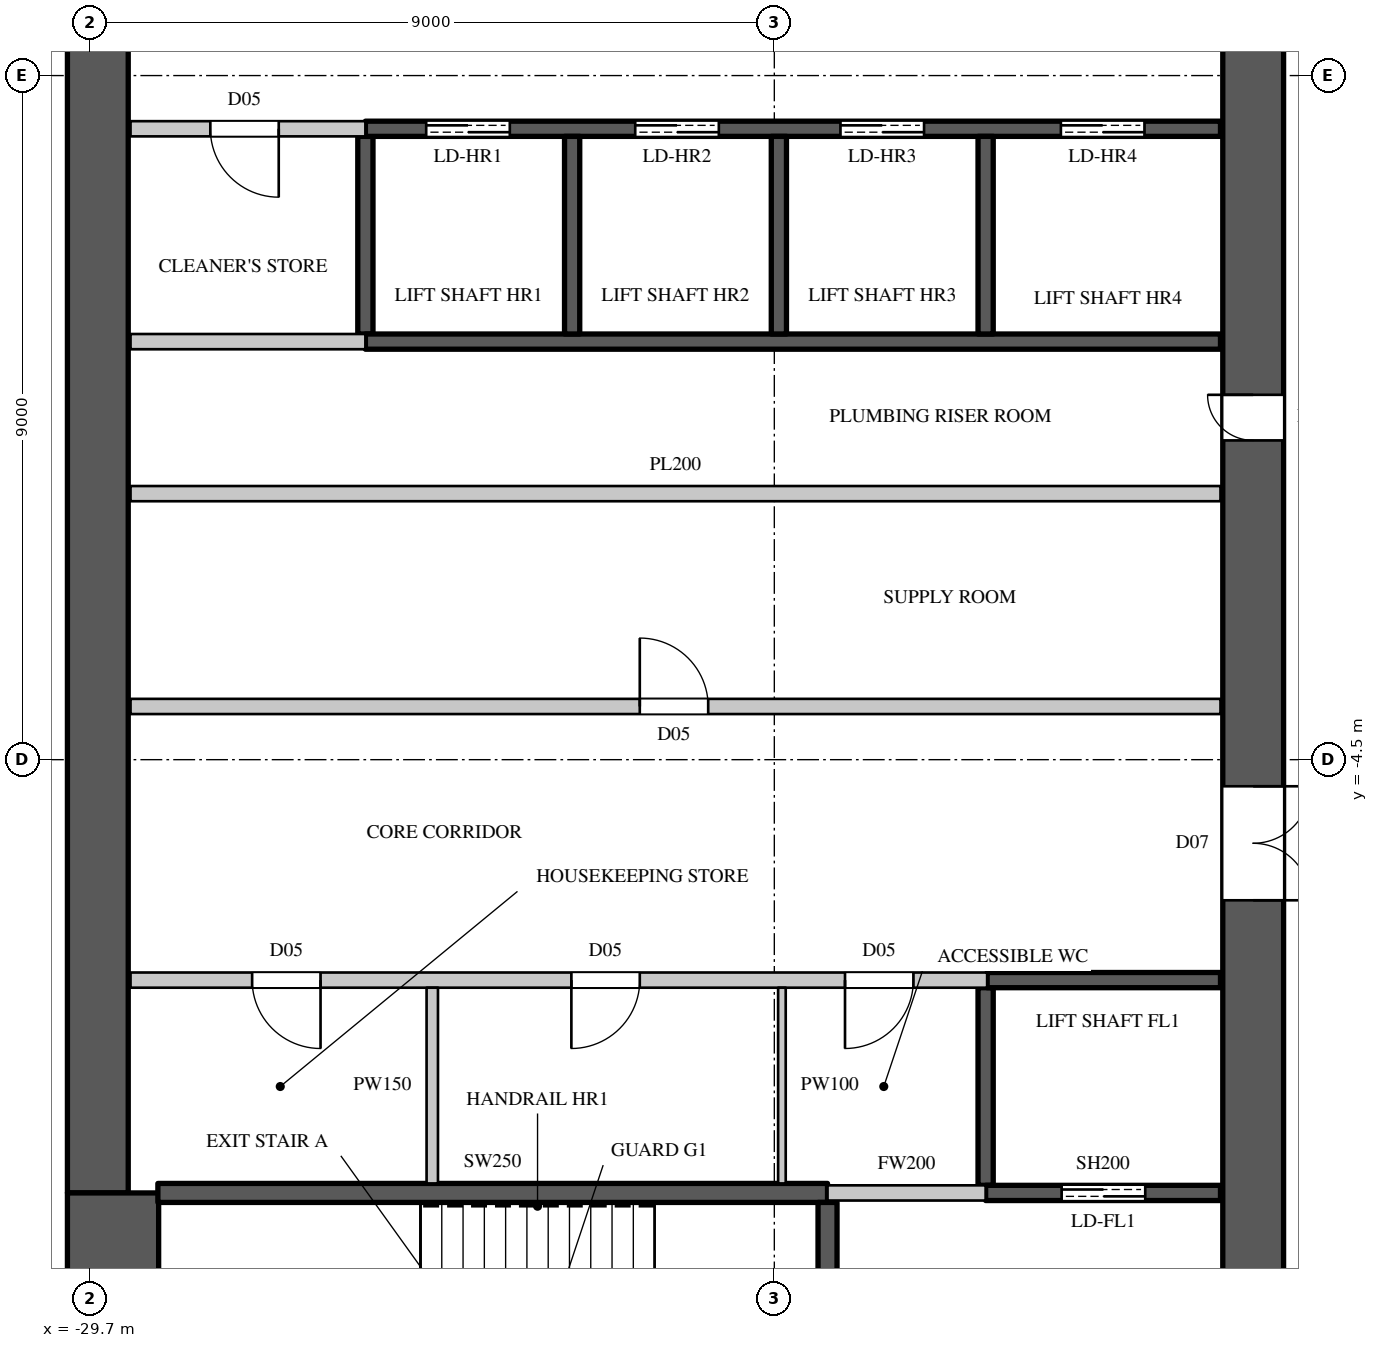
"""IFC4 building model, lengths in metres.
Left out: names, types, materials, properties, quantities, classifications, styles, units other than length and angle.
Written with IfcOpenShell. Run it as: python <this file> out.ifc"""

import sys

from ifc_helpers import new_model, si_unit, direction, frame, frame_2d, origin, place, context, subcontext, project, spatial, rectangle, extrude, element, fill, save


model = new_model("IFC4")
c1 = context("Model", 3, precision=1e-05, world=origin(), true_north=direction((0.0, 1.0)))
c2 = subcontext(c1, "Body", "Model", "MODEL_VIEW")
j1 = project(units=[si_unit("LENGTHUNIT", "METRE"), si_unit("PLANEANGLEUNIT", "RADIAN")], contexts=[c1])
p1 = place(None, origin())
s1 = spatial("IfcSite", under=j1, at=p1, CompositionType="ELEMENT")
p2 = place(p1, origin())
s2 = spatial("IfcBuilding", under=s1, at=p2, CompositionType="ELEMENT")
p3 = place(p2, frame((0.0, 0.0, 226.1)))
s3 = spatial("IfcBuildingStorey", under=s2, at=p3, CompositionType="ELEMENT", Elevation=226.1)
p4 = place(p3, frame((-14.4, -14.8, 0.0), z_axis=(0.0, 0.0, 1.0), x_axis=(0.0, 1.0, 0.0)))
e1 = element("IfcWall", 1, at=p4, inside=s3, PredefinedType="SHEAR", context=c2, shape_type="SweptSolid", body=[
    extrude(rectangle(XDim=29.6, YDim=0.8, at=frame_2d((14.8, 0.0))), origin(), (0.0, 0.0, 1.0), 4.1),
])
p5 = place(p4, frame((1.55, 0.0, 0.0)))
e2 = element("IfcOpeningElement", 2, at=p5, cuts=e1, PredefinedType="OPENING", context=c2, shape_type="SweptSolid", body=[
    extrude(rectangle(XDim=1.5, YDim=2.4, at=frame_2d((0.75, 1.2))), frame((0.0, 0.41, 0.0), z_axis=(0.0, -1.0, 0.0), x_axis=(1.0, 0.0, 0.0)), (0.0, 0.0, 1.0), 0.82),
])
p6 = place(p4, frame((26.55, 0.0, 0.0)))
e3 = element("IfcOpeningElement", 3, at=p6, cuts=e1, PredefinedType="OPENING", context=c2, shape_type="SweptSolid", body=[
    extrude(rectangle(XDim=1.5, YDim=2.4, at=frame_2d((0.75, 1.2))), frame((0.0, 0.41, 0.0), z_axis=(0.0, -1.0, 0.0), x_axis=(1.0, 0.0, 0.0)), (0.0, 0.0, 1.0), 0.82),
])
p7 = place(p4, frame((8.45, 0.0, 0.0)))
e4 = element("IfcOpeningElement", 4, at=p7, cuts=e1, PredefinedType="OPENING", context=c2, shape_type="SweptSolid", body=[
    extrude(rectangle(XDim=1.5, YDim=2.4, at=frame_2d((0.75, 1.2))), frame((0.0, 0.41, 0.0), z_axis=(0.0, -1.0, 0.0), x_axis=(1.0, 0.0, 0.0)), (0.0, 0.0, 1.0), 0.82),
])
p8 = place(p4, frame((19.65, 0.0, 0.0)))
e5 = element("IfcOpeningElement", 5, at=p8, cuts=e1, PredefinedType="OPENING", context=c2, shape_type="SweptSolid", body=[
    extrude(rectangle(XDim=1.5, YDim=2.4, at=frame_2d((0.75, 1.2))), frame((0.0, 0.41, 0.0), z_axis=(0.0, -1.0, 0.0), x_axis=(1.0, 0.0, 0.0)), (0.0, 0.0, 1.0), 0.82),
])
p9 = place(p4, frame((14.5, 0.0, 0.0)))
e6 = element("IfcOpeningElement", 6, at=p9, cuts=e1, PredefinedType="OPENING", context=c2, shape_type="SweptSolid", body=[
    extrude(rectangle(XDim=0.6, YDim=2.0, at=frame_2d((0.3, 1.0))), frame((0.0, 0.41, 0.0), z_axis=(0.0, -1.0, 0.0), x_axis=(1.0, 0.0, 0.0)), (0.0, 0.0, 1.0), 0.82),
])
p10 = place(p3, frame((-29.6, -10.2, 0.0), z_axis=(0.0, 0.0, 1.0), x_axis=(0.0, 1.0, 0.0)))
e7 = element("IfcWall", 7, at=p10, inside=s3, PredefinedType="SHEAR", context=c2, shape_type="SweptSolid", body=[
    extrude(rectangle(XDim=20.4, YDim=0.8, at=frame_2d((10.2, 0.0))), origin(), (0.0, 0.0, 1.0), 4.1),
])
p11 = place(p3, frame((-29.4, -14.8, 0.0), z_axis=(0.0, 0.0, 1.0), x_axis=(0.0, 1.0, 0.0)))
e8 = element("IfcWall", 8, at=p11, inside=s3, PredefinedType="SHEAR", context=c2, shape_type="SweptSolid", body=[
    extrude(rectangle(XDim=4.6, YDim=1.2, at=frame_2d((2.3, 0.0))), origin(), (0.0, 0.0, 1.0), 4.1),
])
p12 = place(p3, frame((-29.17, -7.4, 0.0), z_axis=(0.0, 0.0, 1.0), x_axis=(1.0, 0.0, 0.0)))
e9 = element("IfcWall", 9, at=p12, inside=s3, PredefinedType="PARTITIONING", context=c2, shape_type="SweptSolid", body=[
    extrude(rectangle(XDim=11.27, YDim=0.2, at=frame_2d((5.635, 0.0))), origin(), (0.0, 0.0, 1.0), 3.8),
])
p13 = place(p12, frame((1.6, 0.0, 0.0)))
e10 = element("IfcOpeningElement", 10, at=p13, cuts=e9, PredefinedType="OPENING", context=c2, shape_type="SweptSolid", body=[
    extrude(rectangle(XDim=0.9, YDim=2.2, at=frame_2d((0.45, 1.1))), frame((0.0, 0.11, 0.0), z_axis=(0.0, -1.0, 0.0), x_axis=(1.0, 0.0, 0.0)), (0.0, 0.0, 1.0), 0.22),
])
p14 = place(p12, frame((5.8, 0.0, 0.0)))
e11 = element("IfcOpeningElement", 11, at=p14, cuts=e9, PredefinedType="OPENING", context=c2, shape_type="SweptSolid", body=[
    extrude(rectangle(XDim=0.9, YDim=2.2, at=frame_2d((0.45, 1.1))), frame((0.0, 0.11, 0.0), z_axis=(0.0, -1.0, 0.0), x_axis=(1.0, 0.0, 0.0)), (0.0, 0.0, 1.0), 0.22),
])
p15 = place(p12, frame((9.4, 0.0, 0.0)))
e12 = element("IfcOpeningElement", 12, at=p15, cuts=e9, PredefinedType="OPENING", context=c2, shape_type="SweptSolid", body=[
    extrude(rectangle(XDim=0.9, YDim=2.2, at=frame_2d((0.45, 1.1))), frame((0.0, 0.11, 0.0), z_axis=(0.0, -1.0, 0.0), x_axis=(1.0, 0.0, 0.0)), (0.0, 0.0, 1.0), 0.22),
])
p16 = place(p3, frame((-29.17, -3.8, 0.0), z_axis=(0.0, 0.0, 1.0), x_axis=(1.0, 0.0, 0.0)))
e13 = element("IfcWall", 13, at=p16, inside=s3, PredefinedType="PARTITIONING", context=c2, shape_type="SweptSolid", body=[
    extrude(rectangle(XDim=14.34, YDim=0.2, at=frame_2d((7.17, 0.0))), origin(), (0.0, 0.0, 1.0), 3.8),
])
p17 = place(p16, frame((6.7, 0.0, 0.0)))
e14 = element("IfcOpeningElement", 14, at=p17, cuts=e13, PredefinedType="OPENING", context=c2, shape_type="SweptSolid", body=[
    extrude(rectangle(XDim=0.9, YDim=2.2, at=frame_2d((0.45, 1.1))), frame((0.0, 0.11, 0.0), z_axis=(0.0, -1.0, 0.0), x_axis=(1.0, 0.0, 0.0)), (0.0, 0.0, 1.0), 0.22),
])
p18 = place(p3, frame((-29.17, 3.8, 0.0), z_axis=(0.0, 0.0, 1.0), x_axis=(1.0, 0.0, 0.0)))
e15 = element("IfcWall", 15, at=p18, inside=s3, PredefinedType="PARTITIONING", context=c2, shape_type="SweptSolid", body=[
    extrude(rectangle(XDim=3.09, YDim=0.2, at=frame_2d((1.545, 0.0))), origin(), (0.0, 0.0, 1.0), 3.8),
])
p19 = place(p18, frame((1.05, 0.0, 0.0)))
e16 = element("IfcOpeningElement", 16, at=p19, cuts=e15, PredefinedType="OPENING", context=c2, shape_type="SweptSolid", body=[
    extrude(rectangle(XDim=0.9, YDim=2.2, at=frame_2d((0.45, 1.1))), frame((0.0, 0.11, 0.0), z_axis=(0.0, -1.0, 0.0), x_axis=(1.0, 0.0, 0.0)), (0.0, 0.0, 1.0), 0.22),
])
p20 = place(p3, frame((-20.0, -10.2, 0.0), z_axis=(0.0, 0.0, 1.0), x_axis=(1.0, 0.0, 0.0)))
e17 = element("IfcWall", 17, at=p20, inside=s3, PredefinedType="PARTITIONING", context=c2, shape_type="SweptSolid", body=[
    extrude(rectangle(XDim=2.08, YDim=0.2, at=frame_2d((1.04, 0.0))), origin(), (0.0, 0.0, 1.0), 3.8),
])
p21 = place(p3, frame((-25.2, -10.075, 0.0), z_axis=(0.0, 0.0, 1.0), x_axis=(0.0, 1.0, 0.0)))
e18 = element("IfcWall", 18, at=p21, inside=s3, PredefinedType="PARTITIONING", context=c2, shape_type="SweptSolid", body=[
    extrude(rectangle(XDim=2.575, YDim=0.15, at=frame_2d((1.288, 0.0))), origin(), (0.0, 0.0, 1.0), 3.8),
])
p22 = place(p3, frame((-29.17, -1.0, 0.0), z_axis=(0.0, 0.0, 1.0), x_axis=(1.0, 0.0, 0.0)))
e19 = element("IfcWall", 19, at=p22, inside=s3, PredefinedType="PARTITIONING", context=c2, shape_type="SweptSolid", body=[
    extrude(rectangle(XDim=14.34, YDim=0.2, at=frame_2d((7.17, 0.0))), origin(), (0.0, 0.0, 1.0), 3.8),
])
p23 = place(p3, frame((-29.17, 1.0, 0.0), z_axis=(0.0, 0.0, 1.0), x_axis=(1.0, 0.0, 0.0)))
e20 = element("IfcWall", 20, at=p23, inside=s3, PredefinedType="PARTITIONING", context=c2, shape_type="SweptSolid", body=[
    extrude(rectangle(XDim=3.09, YDim=0.2, at=frame_2d((1.545, 0.0))), origin(), (0.0, 0.0, 1.0), 3.8),
])
p24 = place(p3, frame((-26.08, 1.1, 0.0), z_axis=(0.0, 0.0, 1.0), x_axis=(0.0, 1.0, 0.0)))
e21 = element("IfcWall", 21, at=p24, inside=s3, PredefinedType="SHEAR", context=c2, shape_type="SweptSolid", body=[
    extrude(rectangle(XDim=2.6, YDim=0.2, at=frame_2d((1.3, 0.0))), origin(), (0.0, 0.0, 1.0), 3.8),
])
p25 = place(p3, frame((-26.08, 1.0, 0.0), z_axis=(0.0, 0.0, 1.0), x_axis=(1.0, 0.0, 0.0)))
e22 = element("IfcWall", 22, at=p25, inside=s3, PredefinedType="SHEAR", context=c2, shape_type="SweptSolid", body=[
    extrude(rectangle(XDim=11.25, YDim=0.2, at=frame_2d((5.625, 0.0))), origin(), (0.0, 0.0, 1.0), 3.8),
])
p26 = place(p3, frame((-26.08, 3.8, 0.0), z_axis=(0.0, 0.0, 1.0), x_axis=(1.0, 0.0, 0.0)))
e23 = element("IfcWall", 23, at=p26, inside=s3, PredefinedType="SHEAR", context=c2, shape_type="SweptSolid", body=[
    extrude(rectangle(XDim=11.25, YDim=0.2, at=frame_2d((5.625, 0.0))), origin(), (0.0, 0.0, 1.0), 3.8),
])
p27 = place(p26, frame((0.8, 0.0, 0.0)))
e24 = element("IfcOpeningElement", 24, at=p27, cuts=e23, PredefinedType="OPENING", context=c2, shape_type="SweptSolid", body=[
    extrude(rectangle(XDim=1.1, YDim=2.2, at=frame_2d((0.55, 1.1))), frame((0.0, 0.11, 0.0), z_axis=(0.0, -1.0, 0.0), x_axis=(1.0, 0.0, 0.0)), (0.0, 0.0, 1.0), 0.22),
])
p28 = place(p26, frame((3.55, 0.0, 0.0)))
e25 = element("IfcOpeningElement", 25, at=p28, cuts=e23, PredefinedType="OPENING", context=c2, shape_type="SweptSolid", body=[
    extrude(rectangle(XDim=1.1, YDim=2.2, at=frame_2d((0.55, 1.1))), frame((0.0, 0.11, 0.0), z_axis=(0.0, -1.0, 0.0), x_axis=(1.0, 0.0, 0.0)), (0.0, 0.0, 1.0), 0.22),
])
p29 = place(p26, frame((6.25, 0.0, 0.0)))
e26 = element("IfcOpeningElement", 26, at=p29, cuts=e23, PredefinedType="OPENING", context=c2, shape_type="SweptSolid", body=[
    extrude(rectangle(XDim=1.1, YDim=2.2, at=frame_2d((0.55, 1.1))), frame((0.0, 0.11, 0.0), z_axis=(0.0, -1.0, 0.0), x_axis=(1.0, 0.0, 0.0)), (0.0, 0.0, 1.0), 0.22),
])
p30 = place(p26, frame((9.15, 0.0, 0.0)))
e27 = element("IfcOpeningElement", 27, at=p30, cuts=e23, PredefinedType="OPENING", context=c2, shape_type="SweptSolid", body=[
    extrude(rectangle(XDim=1.1, YDim=2.2, at=frame_2d((0.55, 1.1))), frame((0.0, 0.11, 0.0), z_axis=(0.0, -1.0, 0.0), x_axis=(1.0, 0.0, 0.0)), (0.0, 0.0, 1.0), 0.22),
])
for number, where, z_axis, x_axis in (
    (28, (-23.36, 1.1, 0.0), (0.0, 0.0, 1.0), (0.0, 1.0, 0.0)),
    (29, (-20.64, 1.1, 0.0), (0.0, 0.0, 1.0), (0.0, 1.0, 0.0)),
):
    element("IfcWall", number, at=place(p3, frame(where, z_axis=z_axis, x_axis=x_axis)), inside=s3, PredefinedType="SHEAR", context=c2, shape_type="SweptSolid", body=[
        extrude(rectangle(XDim=2.6, YDim=0.2, at=frame_2d((1.3, 0.0))), origin(), (0.0, 0.0, 1.0), 4.1),
    ])
p31 = place(p3, frame((-17.92, -10.1, 0.0), z_axis=(0.0, 0.0, 1.0), x_axis=(0.0, 1.0, 0.0)))
e30 = element("IfcWall", 30, at=p31, inside=s3, PredefinedType="SHEAR", context=c2, shape_type="SweptSolid", body=[
    extrude(rectangle(XDim=2.6, YDim=0.2, at=frame_2d((1.3, 0.0))), origin(), (0.0, 0.0, 1.0), 3.8),
])
p32 = place(p3, frame((-17.92, -10.2, 0.0), z_axis=(0.0, 0.0, 1.0), x_axis=(1.0, 0.0, 0.0)))
e31 = element("IfcWall", 31, at=p32, inside=s3, PredefinedType="SHEAR", context=c2, shape_type="SweptSolid", body=[
    extrude(rectangle(XDim=3.09, YDim=0.2, at=frame_2d((1.545, 0.0))), origin(), (0.0, 0.0, 1.0), 3.8),
])
p33 = place(p32, frame((1.0, 0.0, 0.0)))
e32 = element("IfcOpeningElement", 32, at=p33, cuts=e31, PredefinedType="OPENING", context=c2, shape_type="SweptSolid", body=[
    extrude(rectangle(XDim=1.1, YDim=2.2, at=frame_2d((0.55, 1.1))), frame((0.0, 0.11, 0.0), z_axis=(0.0, -1.0, 0.0), x_axis=(1.0, 0.0, 0.0)), (0.0, 0.0, 1.0), 0.22),
])
p34 = place(p3, frame((-17.9, -7.4, 0.0), z_axis=(0.0, 0.0, 1.0), x_axis=(1.0, 0.0, 0.0)))
e33 = element("IfcWall", 33, at=p34, inside=s3, PredefinedType="SHEAR", context=c2, shape_type="SweptSolid", body=[
    extrude(rectangle(XDim=3.07, YDim=0.2, at=frame_2d((1.535, 0.0))), origin(), (0.0, 0.0, 1.0), 3.8),
])
p35 = place(p3, frame((-17.92, 1.1, 0.0), z_axis=(0.0, 0.0, 1.0), x_axis=(0.0, 1.0, 0.0)))
e34 = element("IfcWall", 34, at=p35, inside=s3, PredefinedType="SHEAR", context=c2, shape_type="SweptSolid", body=[
    extrude(rectangle(XDim=2.6, YDim=0.2, at=frame_2d((1.3, 0.0))), origin(), (0.0, 0.0, 1.0), 4.1),
])
p36 = place(p3, frame((-28.81, -10.2, 0.0), z_axis=(0.0, 0.0, 1.0), x_axis=(1.0, 0.0, 0.0)))
e35 = element("IfcWall", 35, at=p36, inside=s3, PredefinedType="SHEAR", context=c2, shape_type="SweptSolid", body=[
    extrude(rectangle(XDim=8.81, YDim=0.25, at=frame_2d((4.405, 0.0))), origin(), (0.0, 0.0, 1.0), 3.8),
])
p37 = place(p3, frame((-20.0, -14.77, 0.0), z_axis=(0.0, 0.0, 1.0), x_axis=(0.0, 1.0, 0.0)))
e36 = element("IfcWall", 36, at=p37, inside=s3, PredefinedType="SHEAR", context=c2, shape_type="SweptSolid", body=[
    extrude(rectangle(XDim=4.445, YDim=0.25, at=frame_2d((2.223, 0.0))), origin(), (0.0, 0.0, 1.0), 3.8),
])
p38 = place(p37, frame((1.7, 0.0, 0.0)))
e37 = element("IfcOpeningElement", 37, at=p38, cuts=e36, PredefinedType="OPENING", context=c2, shape_type="SweptSolid", body=[
    extrude(rectangle(XDim=1.1, YDim=2.2, at=frame_2d((0.55, 1.1))), frame((0.0, 0.135, 0.0), z_axis=(0.0, -1.0, 0.0), x_axis=(1.0, 0.0, 0.0)), (0.0, 0.0, 1.0), 0.27),
])
p39 = place(p3, frame((-20.6, -10.075, 0.0), z_axis=(0.0, 0.0, 1.0), x_axis=(0.0, 1.0, 0.0)))
e38 = element("IfcWall", 38, at=p39, inside=s3, PredefinedType="PARTITIONING", context=c2, shape_type="SweptSolid", body=[
    extrude(rectangle(XDim=2.575, YDim=0.1, at=frame_2d((1.288, 0.0))), origin(), (0.0, 0.0, 1.0), 3.8),
])
p40 = place(p13, origin())
e39 = element("IfcDoor", 39, at=p40, inside=s3, OperationType="SINGLE_SWING_LEFT", PredefinedType="DOOR", context=c2, shape_type="SweptSolid", body=[
    extrude(rectangle(XDim=0.9, YDim=2.2, at=frame_2d((0.45, 1.1))), frame((0.0, 0.025, 0.0), z_axis=(0.0, -1.0, 0.0), x_axis=(1.0, 0.0, 0.0)), (0.0, 0.0, 1.0), 0.05),
])
fill(e10, e39)
p41 = place(p14, origin())
e40 = element("IfcDoor", 40, at=p41, inside=s3, OperationType="SINGLE_SWING_RIGHT", PredefinedType="DOOR", context=c2, shape_type="SweptSolid", body=[
    extrude(rectangle(XDim=0.9, YDim=2.2, at=frame_2d((0.45, 1.1))), frame((0.0, 0.025, 0.0), z_axis=(0.0, -1.0, 0.0), x_axis=(1.0, 0.0, 0.0)), (0.0, 0.0, 1.0), 0.05),
])
fill(e11, e40)
p42 = place(p15, origin())
e41 = element("IfcDoor", 41, at=p42, inside=s3, OperationType="SINGLE_SWING_RIGHT", PredefinedType="DOOR", context=c2, shape_type="SweptSolid", body=[
    extrude(rectangle(XDim=0.9, YDim=2.2, at=frame_2d((0.45, 1.1))), frame((0.0, 0.025, 0.0), z_axis=(0.0, -1.0, 0.0), x_axis=(1.0, 0.0, 0.0)), (0.0, 0.0, 1.0), 0.05),
])
fill(e12, e41)
p43 = place(p17, origin())
e42 = element("IfcDoor", 42, at=p43, inside=s3, OperationType="SINGLE_SWING_LEFT", PredefinedType="DOOR", context=c2, shape_type="SweptSolid", body=[
    extrude(rectangle(XDim=0.9, YDim=2.2, at=frame_2d((0.45, 1.1))), frame((0.0, 0.025, 0.0), z_axis=(0.0, -1.0, 0.0), x_axis=(1.0, 0.0, 0.0)), (0.0, 0.0, 1.0), 0.05),
])
fill(e14, e42)
p44 = place(p19, origin())
e43 = element("IfcDoor", 43, at=p44, inside=s3, OperationType="SINGLE_SWING_LEFT", PredefinedType="DOOR", context=c2, shape_type="SweptSolid", body=[
    extrude(rectangle(XDim=0.9, YDim=2.2, at=frame_2d((0.45, 1.1))), frame((0.0, 0.025, 0.0), z_axis=(0.0, -1.0, 0.0), x_axis=(1.0, 0.0, 0.0)), (0.0, 0.0, 1.0), 0.05),
])
fill(e16, e43)
p45 = place(p33, origin())
e44 = element("IfcDoor", 44, at=p45, inside=s3, OperationType="DOUBLE_DOOR_SLIDING", PredefinedType="DOOR", context=c2, shape_type="SweptSolid", body=[
    extrude(rectangle(XDim=1.1, YDim=2.2, at=frame_2d((0.55, 1.1))), frame((0.0, 0.025, 0.0), z_axis=(0.0, -1.0, 0.0), x_axis=(1.0, 0.0, 0.0)), (0.0, 0.0, 1.0), 0.05),
])
fill(e32, e44)
p46 = place(p27, origin())
e45 = element("IfcDoor", 45, at=p46, inside=s3, OperationType="DOUBLE_DOOR_SLIDING", PredefinedType="DOOR", context=c2, shape_type="SweptSolid", body=[
    extrude(rectangle(XDim=1.1, YDim=2.2, at=frame_2d((0.55, 1.1))), frame((0.0, 0.025, 0.0), z_axis=(0.0, -1.0, 0.0), x_axis=(1.0, 0.0, 0.0)), (0.0, 0.0, 1.0), 0.05),
])
fill(e24, e45)
p47 = place(p28, origin())
e46 = element("IfcDoor", 46, at=p47, inside=s3, OperationType="DOUBLE_DOOR_SLIDING", PredefinedType="DOOR", context=c2, shape_type="SweptSolid", body=[
    extrude(rectangle(XDim=1.1, YDim=2.2, at=frame_2d((0.55, 1.1))), frame((0.0, 0.025, 0.0), z_axis=(0.0, -1.0, 0.0), x_axis=(1.0, 0.0, 0.0)), (0.0, 0.0, 1.0), 0.05),
])
fill(e25, e46)
p48 = place(p29, origin())
e47 = element("IfcDoor", 47, at=p48, inside=s3, OperationType="DOUBLE_DOOR_SLIDING", PredefinedType="DOOR", context=c2, shape_type="SweptSolid", body=[
    extrude(rectangle(XDim=1.1, YDim=2.2, at=frame_2d((0.55, 1.1))), frame((0.0, 0.025, 0.0), z_axis=(0.0, -1.0, 0.0), x_axis=(1.0, 0.0, 0.0)), (0.0, 0.0, 1.0), 0.05),
])
fill(e26, e47)
p49 = place(p30, origin())
e48 = element("IfcDoor", 48, at=p49, inside=s3, OperationType="DOUBLE_DOOR_SLIDING", PredefinedType="DOOR", context=c2, shape_type="SweptSolid", body=[
    extrude(rectangle(XDim=1.1, YDim=2.2, at=frame_2d((0.55, 1.1))), frame((0.0, 0.025, 0.0), z_axis=(0.0, -1.0, 0.0), x_axis=(1.0, 0.0, 0.0)), (0.0, 0.0, 1.0), 0.05),
])
fill(e27, e48)
p50 = place(p7, origin())
e49 = element("IfcDoor", 49, at=p50, inside=s3, OperationType="DOUBLE_DOOR_SINGLE_SWING", PredefinedType="DOOR", context=c2, shape_type="SweptSolid", body=[
    extrude(rectangle(XDim=1.5, YDim=2.4, at=frame_2d((0.75, 1.2))), frame((0.0, -0.345, 0.0), z_axis=(0.0, -1.0, 0.0), x_axis=(1.0, 0.0, 0.0)), (0.0, 0.0, 1.0), 0.05),
])
fill(e4, e49)
p51 = place(p9, origin())
e50 = element("IfcDoor", 50, at=p51, inside=s3, OperationType="SINGLE_SWING_RIGHT", PredefinedType="DOOR", context=c2, shape_type="SweptSolid", body=[
    extrude(rectangle(XDim=0.6, YDim=2.0, at=frame_2d((0.3, 1.0))), frame((0.0, 0.395, 0.0), z_axis=(0.0, -1.0, 0.0), x_axis=(1.0, 0.0, 0.0)), (0.0, 0.0, 1.0), 0.05),
])
fill(e6, e50)
save(model, sys.argv[1])
